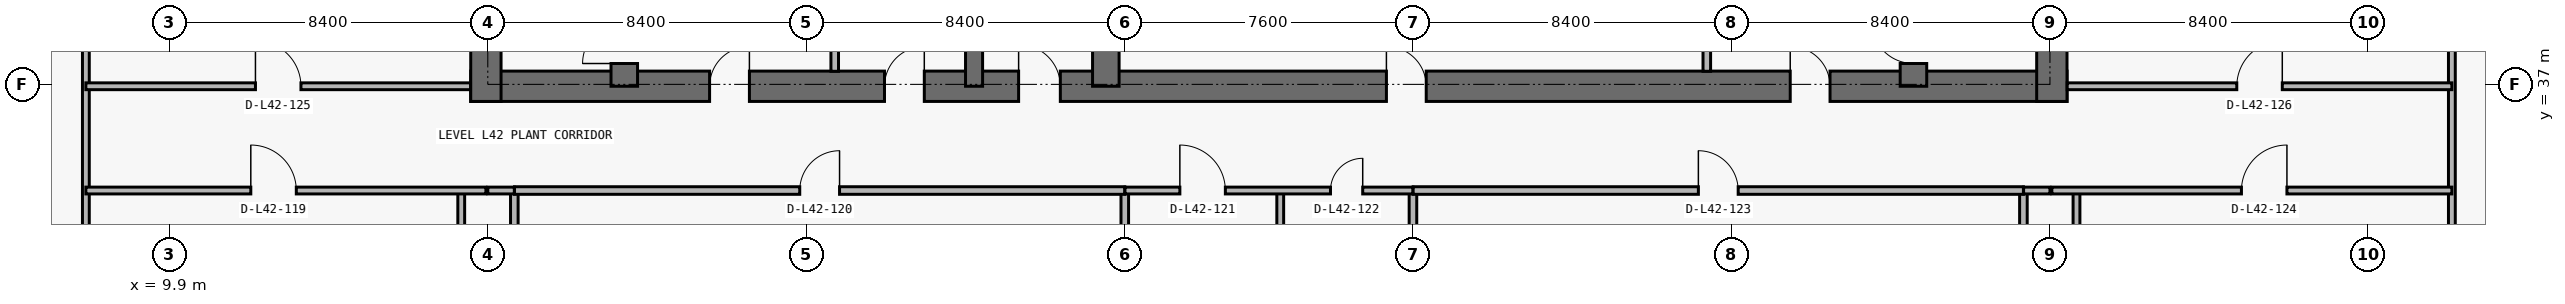
"""IFC4 building model, lengths in metres.
Left out: names, types, materials, properties, quantities, classifications, styles, units other than length and angle.
Written with IfcOpenShell. Run it as: python <this file> out.ifc"""

import sys

from ifc_helpers import new_model, si_unit, direction, frame, frame_2d, origin, place, context, subcontext, project, spatial, rectangle, extrude, element, fill, save


model = new_model("IFC4")
c1 = context("Model", 3, precision=1e-05, world=origin(), true_north=direction((0.0, 1.0)))
c2 = subcontext(c1, "Body", "Model", "MODEL_VIEW")
j1 = project(units=[si_unit("LENGTHUNIT", "METRE"), si_unit("PLANEANGLEUNIT", "RADIAN")], contexts=[c1])
p1 = place(None, origin())
s1 = spatial("IfcSite", under=j1, at=p1, CompositionType="ELEMENT")
p2 = place(p1, origin())
s2 = spatial("IfcBuilding", under=s1, at=p2, CompositionType="ELEMENT")
p3 = place(p2, frame((0.0, 0.0, 152.1)))
s3 = spatial("IfcBuildingStorey", under=s2, at=p3, CompositionType="ELEMENT", Elevation=152.1)
p4 = place(p3, frame((17.85, 36.95, 0.0), z_axis=(0.0, 0.0, 1.0), x_axis=(1.0, 0.0, 0.0)))
e1 = element("IfcWall", 1, at=p4, inside=s3, PredefinedType="SHEAR", context=c2, shape_type="SweptSolid", body=[
    extrude(rectangle(XDim=42.1, YDim=0.8, at=frame_2d((21.05, 0.0))), origin(), (0.0, 0.0, 1.0), 4.85),
])
p5 = place(p4, frame((14.45, 0.0, 0.0)))
e2 = element("IfcOpeningElement", 2, at=p5, cuts=e1, PredefinedType="OPENING", context=c2, shape_type="SweptSolid", body=[
    extrude(rectangle(XDim=1.1, YDim=2.15, at=frame_2d((0.55, 1.075))), frame((0.0, 0.41, 0.0), z_axis=(0.0, -1.0, 0.0), x_axis=(1.0, 0.0, 0.0)), (0.0, 0.0, 1.0), 0.82),
])
p6 = place(p4, frame((6.3, 0.0, 0.0)))
e3 = element("IfcOpeningElement", 3, at=p6, cuts=e1, PredefinedType="OPENING", context=c2, shape_type="SweptSolid", body=[
    extrude(rectangle(XDim=1.05, YDim=2.15, at=frame_2d((0.525, 1.075))), frame((0.0, 0.41, 0.0), z_axis=(0.0, -1.0, 0.0), x_axis=(1.0, 0.0, 0.0)), (0.0, 0.0, 1.0), 0.82),
])
p7 = place(p4, frame((34.8, 0.0, 0.0)))
e4 = element("IfcOpeningElement", 4, at=p7, cuts=e1, PredefinedType="OPENING", context=c2, shape_type="SweptSolid", body=[
    extrude(rectangle(XDim=1.05, YDim=2.15, at=frame_2d((0.525, 1.075))), frame((0.0, 0.41, 0.0), z_axis=(0.0, -1.0, 0.0), x_axis=(1.0, 0.0, 0.0)), (0.0, 0.0, 1.0), 0.82),
])
p8 = place(p4, frame((10.913, 0.0, 0.0)))
e5 = element("IfcOpeningElement", 5, at=p8, cuts=e1, PredefinedType="OPENING", context=c2, shape_type="SweptSolid", body=[
    extrude(rectangle(XDim=1.05, YDim=2.15, at=frame_2d((0.525, 1.075))), frame((0.0, 0.41, 0.0), z_axis=(0.0, -1.0, 0.0), x_axis=(1.0, 0.0, 0.0)), (0.0, 0.0, 1.0), 0.82),
])
p9 = place(p4, frame((24.15, 0.0, 0.0)))
e6 = element("IfcOpeningElement", 6, at=p9, cuts=e1, PredefinedType="OPENING", context=c2, shape_type="SweptSolid", body=[
    extrude(rectangle(XDim=1.05, YDim=2.15, at=frame_2d((0.525, 1.075))), frame((0.0, 0.41, 0.0), z_axis=(0.0, -1.0, 0.0), x_axis=(1.0, 0.0, 0.0)), (0.0, 0.0, 1.0), 0.82),
])
for number, where, z_axis, x_axis in (
    (7, (18.25, 36.55, 0.0), (0.0, 0.0, 1.0), (0.0, 1.0, 0.0)),
    (8, (59.55, 36.55, 0.0), (0.0, 0.0, 1.0), (0.0, 1.0, 0.0)),
):
    element("IfcWall", number, at=place(p3, frame(where, z_axis=z_axis, x_axis=x_axis)), inside=s3, PredefinedType="SHEAR", context=c2, shape_type="SweptSolid", body=[
        extrude(rectangle(XDim=14.05, YDim=0.8, at=frame_2d((7.025, 0.0))), origin(), (0.0, 0.0, 1.0), 4.85),
    ])
p10 = place(p3, frame((21.9, 36.95, 0.0), z_axis=(0.0, 0.0, 1.0), x_axis=(0.0, 1.0, 0.0)))
e9 = element("IfcWall", 9, at=p10, inside=s3, PredefinedType="SHEAR", context=c2, shape_type="SweptSolid", body=[
    extrude(rectangle(XDim=9.625, YDim=0.7, at=frame_2d((4.812, 0.0))), origin(), (0.0, 0.0, 1.0), 4.85),
])
p11 = place(p10, frame((0.6, 0.0, 0.0)))
e10 = element("IfcOpeningElement", 10, at=p11, cuts=e9, PredefinedType="OPENING", context=c2, shape_type="SweptSolid", body=[
    extrude(rectangle(XDim=1.1, YDim=2.15, at=frame_2d((0.55, 1.075))), frame((0.0, 0.36, 0.0), z_axis=(0.0, -1.0, 0.0), x_axis=(1.0, 0.0, 0.0)), (0.0, 0.0, 1.0), 0.72),
])
p12 = place(p3, frame((55.9, 36.95, 0.0), z_axis=(0.0, 0.0, 1.0), x_axis=(0.0, 1.0, 0.0)))
e11 = element("IfcWall", 11, at=p12, inside=s3, PredefinedType="SHEAR", context=c2, shape_type="SweptSolid", body=[
    extrude(rectangle(XDim=9.625, YDim=0.7, at=frame_2d((4.812, 0.0))), origin(), (0.0, 0.0, 1.0), 4.85),
])
p13 = place(p12, frame((0.6, 0.0, 0.0)))
e12 = element("IfcOpeningElement", 12, at=p13, cuts=e11, PredefinedType="OPENING", context=c2, shape_type="SweptSolid", body=[
    extrude(rectangle(XDim=1.1, YDim=2.15, at=frame_2d((0.55, 1.075))), frame((0.0, 0.36, 0.0), z_axis=(0.0, -1.0, 0.0), x_axis=(1.0, 0.0, 0.0)), (0.0, 0.0, 1.0), 0.72),
])
p14 = place(p3, frame((31.125, 36.95, 0.0), z_axis=(0.0, 0.0, 1.0), x_axis=(0.0, 1.0, 0.0)))
e13 = element("IfcWall", 13, at=p14, inside=s3, PredefinedType="SHEAR", context=c2, shape_type="SweptSolid", body=[
    extrude(rectangle(XDim=9.625, YDim=0.45, at=frame_2d((4.812, 0.0))), origin(), (0.0, 0.0, 1.0), 4.85),
])
p15 = place(p3, frame((34.6, 36.95, 0.0), z_axis=(0.0, 0.0, 1.0), x_axis=(0.0, 1.0, 0.0)))
e14 = element("IfcWall", 14, at=p15, inside=s3, PredefinedType="SHEAR", context=c2, shape_type="SweptSolid", body=[
    extrude(rectangle(XDim=9.625, YDim=0.7, at=frame_2d((4.812, 0.0))), origin(), (0.0, 0.0, 1.0), 4.85),
])
p16 = place(p3, frame((7.7, 12.9, 0.0), z_axis=(0.0, 0.0, 1.0), x_axis=(0.0, 1.0, 0.0)))
e15 = element("IfcWall", 15, at=p16, inside=s3, PredefinedType="PARTITIONING", context=c2, shape_type="SweptSolid", body=[
    extrude(rectangle(XDim=34.18, YDim=0.18, at=frame_2d((17.09, 0.0))), origin(), (0.0, 0.0, 1.0), 4.85),
])
p17 = place(p3, frame((17.6, 12.9, 0.0), z_axis=(0.0, 0.0, 1.0), x_axis=(0.0, 1.0, 0.0)))
e16 = element("IfcWall", 16, at=p17, inside=s3, PredefinedType="PARTITIONING", context=c2, shape_type="SweptSolid", body=[
    extrude(rectangle(XDim=21.3, YDim=0.18, at=frame_2d((10.65, 0.0))), origin(), (0.0, 0.0, 1.0), 4.85),
])
p18 = place(p3, frame((19.0, 12.9, 0.0), z_axis=(0.0, 0.0, 1.0), x_axis=(0.0, 1.0, 0.0)))
e17 = element("IfcWall", 17, at=p18, inside=s3, PredefinedType="PARTITIONING", context=c2, shape_type="SweptSolid", body=[
    extrude(rectangle(XDim=21.3, YDim=0.2, at=frame_2d((10.65, 0.0))), origin(), (0.0, 0.0, 1.0), 4.85),
])
p19 = place(p3, frame((27.45, 37.345, 0.0), z_axis=(0.0, 0.0, 1.0), x_axis=(0.0, 1.0, 0.0)))
e18 = element("IfcWall", 18, at=p19, inside=s3, PredefinedType="PARTITIONING", context=c2, shape_type="SweptSolid", body=[
    extrude(rectangle(XDim=5.385, YDim=0.2, at=frame_2d((2.692, 0.0))), origin(), (0.0, 0.0, 1.0), 4.85),
])
p20 = place(p3, frame((35.1, 12.9, 0.0), z_axis=(0.0, 0.0, 1.0), x_axis=(0.0, 1.0, 0.0)))
e19 = element("IfcWall", 19, at=p20, inside=s3, PredefinedType="PARTITIONING", context=c2, shape_type="SweptSolid", body=[
    extrude(rectangle(XDim=21.3, YDim=0.2, at=frame_2d((10.65, 0.0))), origin(), (0.0, 0.0, 1.0), 3.814),
])
p21 = place(p3, frame((39.2, 29.4, 0.0), z_axis=(0.0, 0.0, 1.0), x_axis=(0.0, 1.0, 0.0)))
e20 = element("IfcWall", 20, at=p21, inside=s3, PredefinedType="PARTITIONING", context=c2, shape_type="SweptSolid", body=[
    extrude(rectangle(XDim=4.8, YDim=0.18, at=frame_2d((2.4, 0.0))), origin(), (0.0, 0.0, 1.0), 4.85),
])
p22 = place(p3, frame((42.7, 12.9, 0.0), z_axis=(0.0, 0.0, 1.0), x_axis=(0.0, 1.0, 0.0)))
e21 = element("IfcWall", 21, at=p22, inside=s3, PredefinedType="PARTITIONING", context=c2, shape_type="SweptSolid", body=[
    extrude(rectangle(XDim=21.3, YDim=0.2, at=frame_2d((10.65, 0.0))), origin(), (0.0, 0.0, 1.0), 3.814),
])
p23 = place(p3, frame((50.45, 37.345, 0.0), z_axis=(0.0, 0.0, 1.0), x_axis=(0.0, 1.0, 0.0)))
e22 = element("IfcWall", 22, at=p23, inside=s3, PredefinedType="PARTITIONING", context=c2, shape_type="SweptSolid", body=[
    extrude(rectangle(XDim=5.385, YDim=0.2, at=frame_2d((2.692, 0.0))), origin(), (0.0, 0.0, 1.0), 4.85),
])
p24 = place(p3, frame((58.8, 12.9, 0.0), z_axis=(0.0, 0.0, 1.0), x_axis=(0.0, 1.0, 0.0)))
e23 = element("IfcWall", 23, at=p24, inside=s3, PredefinedType="PARTITIONING", context=c2, shape_type="SweptSolid", body=[
    extrude(rectangle(XDim=21.3, YDim=0.2, at=frame_2d((10.65, 0.0))), origin(), (0.0, 0.0, 1.0), 4.85),
])
p25 = place(p3, frame((60.2, 12.9, 0.0), z_axis=(0.0, 0.0, 1.0), x_axis=(0.0, 1.0, 0.0)))
e24 = element("IfcWall", 24, at=p25, inside=s3, PredefinedType="PARTITIONING", context=c2, shape_type="SweptSolid", body=[
    extrude(rectangle(XDim=21.3, YDim=0.18, at=frame_2d((10.65, 0.0))), origin(), (0.0, 0.0, 1.0), 4.85),
])
p26 = place(p3, frame((70.1, 12.9, 0.0), z_axis=(0.0, 0.0, 1.0), x_axis=(0.0, 1.0, 0.0)))
e25 = element("IfcWall", 25, at=p26, inside=s3, PredefinedType="PARTITIONING", context=c2, shape_type="SweptSolid", body=[
    extrude(rectangle(XDim=34.18, YDim=0.18, at=frame_2d((17.09, 0.0))), origin(), (0.0, 0.0, 1.0), 4.85),
])
p27 = place(p3, frame((7.7, 34.2, 0.0), z_axis=(0.0, 0.0, 1.0), x_axis=(1.0, 0.0, 0.0)))
e26 = element("IfcWall", 26, at=p27, inside=s3, PredefinedType="PARTITIONING", context=c2, shape_type="SweptSolid", body=[
    extrude(rectangle(XDim=10.55, YDim=0.18, at=frame_2d((5.275, 0.0))), origin(), (0.0, 0.0, 1.0), 4.85),
])
p28 = place(p27, frame((4.35, 0.0, 0.0)))
e27 = element("IfcOpeningElement", 27, at=p28, cuts=e26, PredefinedType="OPENING", context=c2, shape_type="SweptSolid", body=[
    extrude(rectangle(XDim=1.2, YDim=2.2, at=frame_2d((0.6, 1.1))), frame((0.0, 0.1, 0.0), z_axis=(0.0, -1.0, 0.0), x_axis=(1.0, 0.0, 0.0)), (0.0, 0.0, 1.0), 0.2),
])
p29 = place(p3, frame((18.3, 34.2, 0.0), z_axis=(0.0, 0.0, 1.0), x_axis=(1.0, 0.0, 0.0)))
e28 = element("IfcWall", 28, at=p29, inside=s3, PredefinedType="PARTITIONING", context=c2, shape_type="SweptSolid", body=[
    extrude(rectangle(XDim=0.7, YDim=0.18, at=frame_2d((0.35, 0.0))), origin(), (0.0, 0.0, 1.0), 4.85),
])
p30 = place(p3, frame((19.005, 34.2, 0.0), z_axis=(0.0, 0.0, 1.0), x_axis=(1.0, 0.0, 0.0)))
e29 = element("IfcWall", 29, at=p30, inside=s3, PredefinedType="PARTITIONING", context=c2, shape_type="SweptSolid", body=[
    extrude(rectangle(XDim=16.095, YDim=0.2, at=frame_2d((8.048, 0.0))), origin(), (0.0, 0.0, 1.0), 4.85),
])
p31 = place(p30, frame((7.522, 0.0, 0.0)))
e30 = element("IfcOpeningElement", 30, at=p31, cuts=e29, PredefinedType="OPENING", context=c2, shape_type="SweptSolid", body=[
    extrude(rectangle(XDim=1.05, YDim=2.15, at=frame_2d((0.525, 1.075))), frame((0.0, 0.11, 0.0), z_axis=(0.0, -1.0, 0.0), x_axis=(1.0, 0.0, 0.0)), (0.0, 0.0, 1.0), 0.22),
])
p32 = place(p3, frame((35.105, 34.2, 0.0), z_axis=(0.0, 0.0, 1.0), x_axis=(1.0, 0.0, 0.0)))
e31 = element("IfcWall", 31, at=p32, inside=s3, PredefinedType="PARTITIONING", context=c2, shape_type="SweptSolid", body=[
    extrude(rectangle(XDim=7.595, YDim=0.18, at=frame_2d((3.797, 0.0))), origin(), (0.0, 0.0, 1.0), 4.85),
])
p33 = place(p32, frame((1.448, 0.0, 0.0)))
e32 = element("IfcOpeningElement", 32, at=p33, cuts=e31, PredefinedType="OPENING", context=c2, shape_type="SweptSolid", body=[
    extrude(rectangle(XDim=1.2, YDim=2.2, at=frame_2d((0.6, 1.1))), frame((0.0, 0.1, 0.0), z_axis=(0.0, -1.0, 0.0), x_axis=(1.0, 0.0, 0.0)), (0.0, 0.0, 1.0), 0.2),
])
p34 = place(p32, frame((5.42, 0.0, 0.0)))
e33 = element("IfcOpeningElement", 33, at=p34, cuts=e31, PredefinedType="OPENING", context=c2, shape_type="SweptSolid", body=[
    extrude(rectangle(XDim=0.85, YDim=2.1, at=frame_2d((0.425, 1.05))), frame((0.0, 0.1, 0.0), z_axis=(0.0, -1.0, 0.0), x_axis=(1.0, 0.0, 0.0)), (0.0, 0.0, 1.0), 0.2),
])
p35 = place(p3, frame((42.705, 34.2, 0.0), z_axis=(0.0, 0.0, 1.0), x_axis=(1.0, 0.0, 0.0)))
e34 = element("IfcWall", 34, at=p35, inside=s3, PredefinedType="PARTITIONING", context=c2, shape_type="SweptSolid", body=[
    extrude(rectangle(XDim=16.095, YDim=0.2, at=frame_2d((8.047, 0.0))), origin(), (0.0, 0.0, 1.0), 4.85),
])
p36 = place(p35, frame((7.522, 0.0, 0.0)))
e35 = element("IfcOpeningElement", 35, at=p36, cuts=e34, PredefinedType="OPENING", context=c2, shape_type="SweptSolid", body=[
    extrude(rectangle(XDim=1.05, YDim=2.15, at=frame_2d((0.525, 1.075))), frame((0.0, 0.11, 0.0), z_axis=(0.0, -1.0, 0.0), x_axis=(1.0, 0.0, 0.0)), (0.0, 0.0, 1.0), 0.22),
])
p37 = place(p3, frame((58.805, 34.2, 0.0), z_axis=(0.0, 0.0, 1.0), x_axis=(1.0, 0.0, 0.0)))
e36 = element("IfcWall", 36, at=p37, inside=s3, PredefinedType="PARTITIONING", context=c2, shape_type="SweptSolid", body=[
    extrude(rectangle(XDim=0.695, YDim=0.18, at=frame_2d((0.348, 0.0))), origin(), (0.0, 0.0, 1.0), 4.85),
])
p38 = place(p3, frame((59.55, 34.2, 0.0), z_axis=(0.0, 0.0, 1.0), x_axis=(1.0, 0.0, 0.0)))
e37 = element("IfcWall", 37, at=p38, inside=s3, PredefinedType="PARTITIONING", context=c2, shape_type="SweptSolid", body=[
    extrude(rectangle(XDim=10.55, YDim=0.18, at=frame_2d((5.275, 0.0))), origin(), (0.0, 0.0, 1.0), 4.85),
])
p39 = place(p38, frame((5.0, 0.0, 0.0)))
e38 = element("IfcOpeningElement", 38, at=p39, cuts=e37, PredefinedType="OPENING", context=c2, shape_type="SweptSolid", body=[
    extrude(rectangle(XDim=1.2, YDim=2.2, at=frame_2d((0.6, 1.1))), frame((0.0, 0.1, 0.0), z_axis=(0.0, -1.0, 0.0), x_axis=(1.0, 0.0, 0.0)), (0.0, 0.0, 1.0), 0.2),
])
p40 = place(p3, frame((7.7, 36.95, 0.0), z_axis=(0.0, 0.0, 1.0), x_axis=(1.0, 0.0, 0.0)))
e39 = element("IfcWall", 39, at=p40, inside=s3, PredefinedType="PARTITIONING", context=c2, shape_type="SweptSolid", body=[
    extrude(rectangle(XDim=10.145, YDim=0.18, at=frame_2d((5.073, 0.0))), origin(), (0.0, 0.0, 1.0), 4.85),
])
p41 = place(p40, frame((4.472, 0.0, 0.0)))
e40 = element("IfcOpeningElement", 40, at=p41, cuts=e39, PredefinedType="OPENING", context=c2, shape_type="SweptSolid", body=[
    extrude(rectangle(XDim=1.2, YDim=2.2, at=frame_2d((0.6, 1.1))), frame((0.0, 0.1, 0.0), z_axis=(0.0, -1.0, 0.0), x_axis=(1.0, 0.0, 0.0)), (0.0, 0.0, 1.0), 0.2),
])
p42 = place(p3, frame((59.955, 36.95, 0.0), z_axis=(0.0, 0.0, 1.0), x_axis=(1.0, 0.0, 0.0)))
e41 = element("IfcWall", 41, at=p42, inside=s3, PredefinedType="PARTITIONING", context=c2, shape_type="SweptSolid", body=[
    extrude(rectangle(XDim=10.145, YDim=0.18, at=frame_2d((5.073, 0.0))), origin(), (0.0, 0.0, 1.0), 4.85),
])
p43 = place(p42, frame((4.472, 0.0, 0.0)))
e42 = element("IfcOpeningElement", 42, at=p43, cuts=e41, PredefinedType="OPENING", context=c2, shape_type="SweptSolid", body=[
    extrude(rectangle(XDim=1.2, YDim=2.2, at=frame_2d((0.6, 1.1))), frame((0.0, 0.1, 0.0), z_axis=(0.0, -1.0, 0.0), x_axis=(1.0, 0.0, 0.0)), (0.0, 0.0, 1.0), 0.2),
])
p44 = place(p5, origin())
e43 = element("IfcDoor", 43, at=p44, inside=s3, OperationType="SINGLE_SWING_LEFT", PredefinedType="DOOR", context=c2, shape_type="SweptSolid", body=[
    extrude(rectangle(XDim=1.1, YDim=2.15, at=frame_2d((0.55, 1.075))), frame((0.0, 0.025, 0.0), z_axis=(0.0, -1.0, 0.0), x_axis=(1.0, 0.0, 0.0)), (0.0, 0.0, 1.0), 0.05),
])
fill(e2, e43)
p45 = place(p6, origin())
e44 = element("IfcDoor", 44, at=p45, inside=s3, OperationType="SINGLE_SWING_RIGHT", PredefinedType="DOOR", context=c2, shape_type="SweptSolid", body=[
    extrude(rectangle(XDim=1.05, YDim=2.15, at=frame_2d((0.525, 1.075))), frame((0.0, 0.025, 0.0), z_axis=(0.0, -1.0, 0.0), x_axis=(1.0, 0.0, 0.0)), (0.0, 0.0, 1.0), 0.05),
])
fill(e3, e44)
p46 = place(p11, origin())
e45 = element("IfcDoor", 45, at=p46, inside=s3, OperationType="SINGLE_SWING_LEFT", PredefinedType="DOOR", context=c2, shape_type="SweptSolid", body=[
    extrude(rectangle(XDim=1.1, YDim=2.15, at=frame_2d((0.55, 1.075))), frame((0.0, 0.025, 0.0), z_axis=(0.0, -1.0, 0.0), x_axis=(1.0, 0.0, 0.0)), (0.0, 0.0, 1.0), 0.05),
])
fill(e10, e45)
p47 = place(p7, origin())
e46 = element("IfcDoor", 46, at=p47, inside=s3, OperationType="SINGLE_SWING_LEFT", PredefinedType="DOOR", context=c2, shape_type="SweptSolid", body=[
    extrude(rectangle(XDim=1.05, YDim=2.15, at=frame_2d((0.525, 1.075))), frame((0.0, 0.025, 0.0), z_axis=(0.0, -1.0, 0.0), x_axis=(1.0, 0.0, 0.0)), (0.0, 0.0, 1.0), 0.05),
])
fill(e4, e46)
p48 = place(p13, origin())
e47 = element("IfcDoor", 47, at=p48, inside=s3, OperationType="SINGLE_SWING_RIGHT", PredefinedType="DOOR", context=c2, shape_type="SweptSolid", body=[
    extrude(rectangle(XDim=1.1, YDim=2.15, at=frame_2d((0.55, 1.075))), frame((0.0, 0.025, 0.0), z_axis=(0.0, -1.0, 0.0), x_axis=(1.0, 0.0, 0.0)), (0.0, 0.0, 1.0), 0.05),
])
fill(e12, e47)
p49 = place(p8, origin())
e48 = element("IfcDoor", 48, at=p49, inside=s3, OperationType="SINGLE_SWING_RIGHT", PredefinedType="DOOR", context=c2, shape_type="SweptSolid", body=[
    extrude(rectangle(XDim=1.05, YDim=2.15, at=frame_2d((0.525, 1.075))), frame((0.0, 0.025, 0.0), z_axis=(0.0, -1.0, 0.0), x_axis=(1.0, 0.0, 0.0)), (0.0, 0.0, 1.0), 0.05),
])
fill(e5, e48)
p50 = place(p9, origin())
e49 = element("IfcDoor", 49, at=p50, inside=s3, OperationType="SINGLE_SWING_LEFT", PredefinedType="DOOR", context=c2, shape_type="SweptSolid", body=[
    extrude(rectangle(XDim=1.05, YDim=2.15, at=frame_2d((0.525, 1.075))), frame((0.0, 0.025, 0.0), z_axis=(0.0, -1.0, 0.0), x_axis=(1.0, 0.0, 0.0)), (0.0, 0.0, 1.0), 0.05),
])
fill(e6, e49)
p51 = place(p28, origin())
e50 = element("IfcDoor", 50, at=p51, inside=s3, OperationType="SINGLE_SWING_LEFT", PredefinedType="DOOR", context=c2, shape_type="SweptSolid", body=[
    extrude(rectangle(XDim=1.2, YDim=2.2, at=frame_2d((0.6, 1.1))), frame((0.0, 0.025, 0.0), z_axis=(0.0, -1.0, 0.0), x_axis=(1.0, 0.0, 0.0)), (0.0, 0.0, 1.0), 0.05),
])
fill(e27, e50)
p52 = place(p31, origin())
e51 = element("IfcDoor", 51, at=p52, inside=s3, OperationType="SINGLE_SWING_RIGHT", PredefinedType="DOOR", context=c2, shape_type="SweptSolid", body=[
    extrude(rectangle(XDim=1.05, YDim=2.15, at=frame_2d((0.525, 1.075))), frame((0.0, 0.025, 0.0), z_axis=(0.0, -1.0, 0.0), x_axis=(1.0, 0.0, 0.0)), (0.0, 0.0, 1.0), 0.05),
])
fill(e30, e51)
p53 = place(p33, origin())
e52 = element("IfcDoor", 52, at=p53, inside=s3, OperationType="SINGLE_SWING_LEFT", PredefinedType="DOOR", context=c2, shape_type="SweptSolid", body=[
    extrude(rectangle(XDim=1.2, YDim=2.2, at=frame_2d((0.6, 1.1))), frame((0.0, 0.025, 0.0), z_axis=(0.0, -1.0, 0.0), x_axis=(1.0, 0.0, 0.0)), (0.0, 0.0, 1.0), 0.05),
])
fill(e32, e52)
p54 = place(p34, origin())
e53 = element("IfcDoor", 53, at=p54, inside=s3, OperationType="SINGLE_SWING_RIGHT", PredefinedType="DOOR", context=c2, shape_type="SweptSolid", body=[
    extrude(rectangle(XDim=0.85, YDim=2.1, at=frame_2d((0.425, 1.05))), frame((0.0, 0.025, 0.0), z_axis=(0.0, -1.0, 0.0), x_axis=(1.0, 0.0, 0.0)), (0.0, 0.0, 1.0), 0.05),
])
fill(e33, e53)
p55 = place(p36, origin())
e54 = element("IfcDoor", 54, at=p55, inside=s3, OperationType="SINGLE_SWING_LEFT", PredefinedType="DOOR", context=c2, shape_type="SweptSolid", body=[
    extrude(rectangle(XDim=1.05, YDim=2.15, at=frame_2d((0.525, 1.075))), frame((0.0, 0.025, 0.0), z_axis=(0.0, -1.0, 0.0), x_axis=(1.0, 0.0, 0.0)), (0.0, 0.0, 1.0), 0.05),
])
fill(e35, e54)
p56 = place(p39, origin())
e55 = element("IfcDoor", 55, at=p56, inside=s3, OperationType="SINGLE_SWING_RIGHT", PredefinedType="DOOR", context=c2, shape_type="SweptSolid", body=[
    extrude(rectangle(XDim=1.2, YDim=2.2, at=frame_2d((0.6, 1.1))), frame((0.0, 0.025, 0.0), z_axis=(0.0, -1.0, 0.0), x_axis=(1.0, 0.0, 0.0)), (0.0, 0.0, 1.0), 0.05),
])
fill(e38, e55)
p57 = place(p41, origin())
e56 = element("IfcDoor", 56, at=p57, inside=s3, OperationType="SINGLE_SWING_LEFT", PredefinedType="DOOR", context=c2, shape_type="SweptSolid", body=[
    extrude(rectangle(XDim=1.2, YDim=2.2, at=frame_2d((0.6, 1.1))), frame((0.0, 0.025, 0.0), z_axis=(0.0, -1.0, 0.0), x_axis=(1.0, 0.0, 0.0)), (0.0, 0.0, 1.0), 0.05),
])
fill(e40, e56)
p58 = place(p43, origin())
e57 = element("IfcDoor", 57, at=p58, inside=s3, OperationType="SINGLE_SWING_RIGHT", PredefinedType="DOOR", context=c2, shape_type="SweptSolid", body=[
    extrude(rectangle(XDim=1.2, YDim=2.2, at=frame_2d((0.6, 1.1))), frame((0.0, 0.025, 0.0), z_axis=(0.0, -1.0, 0.0), x_axis=(1.0, 0.0, 0.0)), (0.0, 0.0, 1.0), 0.05),
])
fill(e42, e57)
save(model, sys.argv[1])
